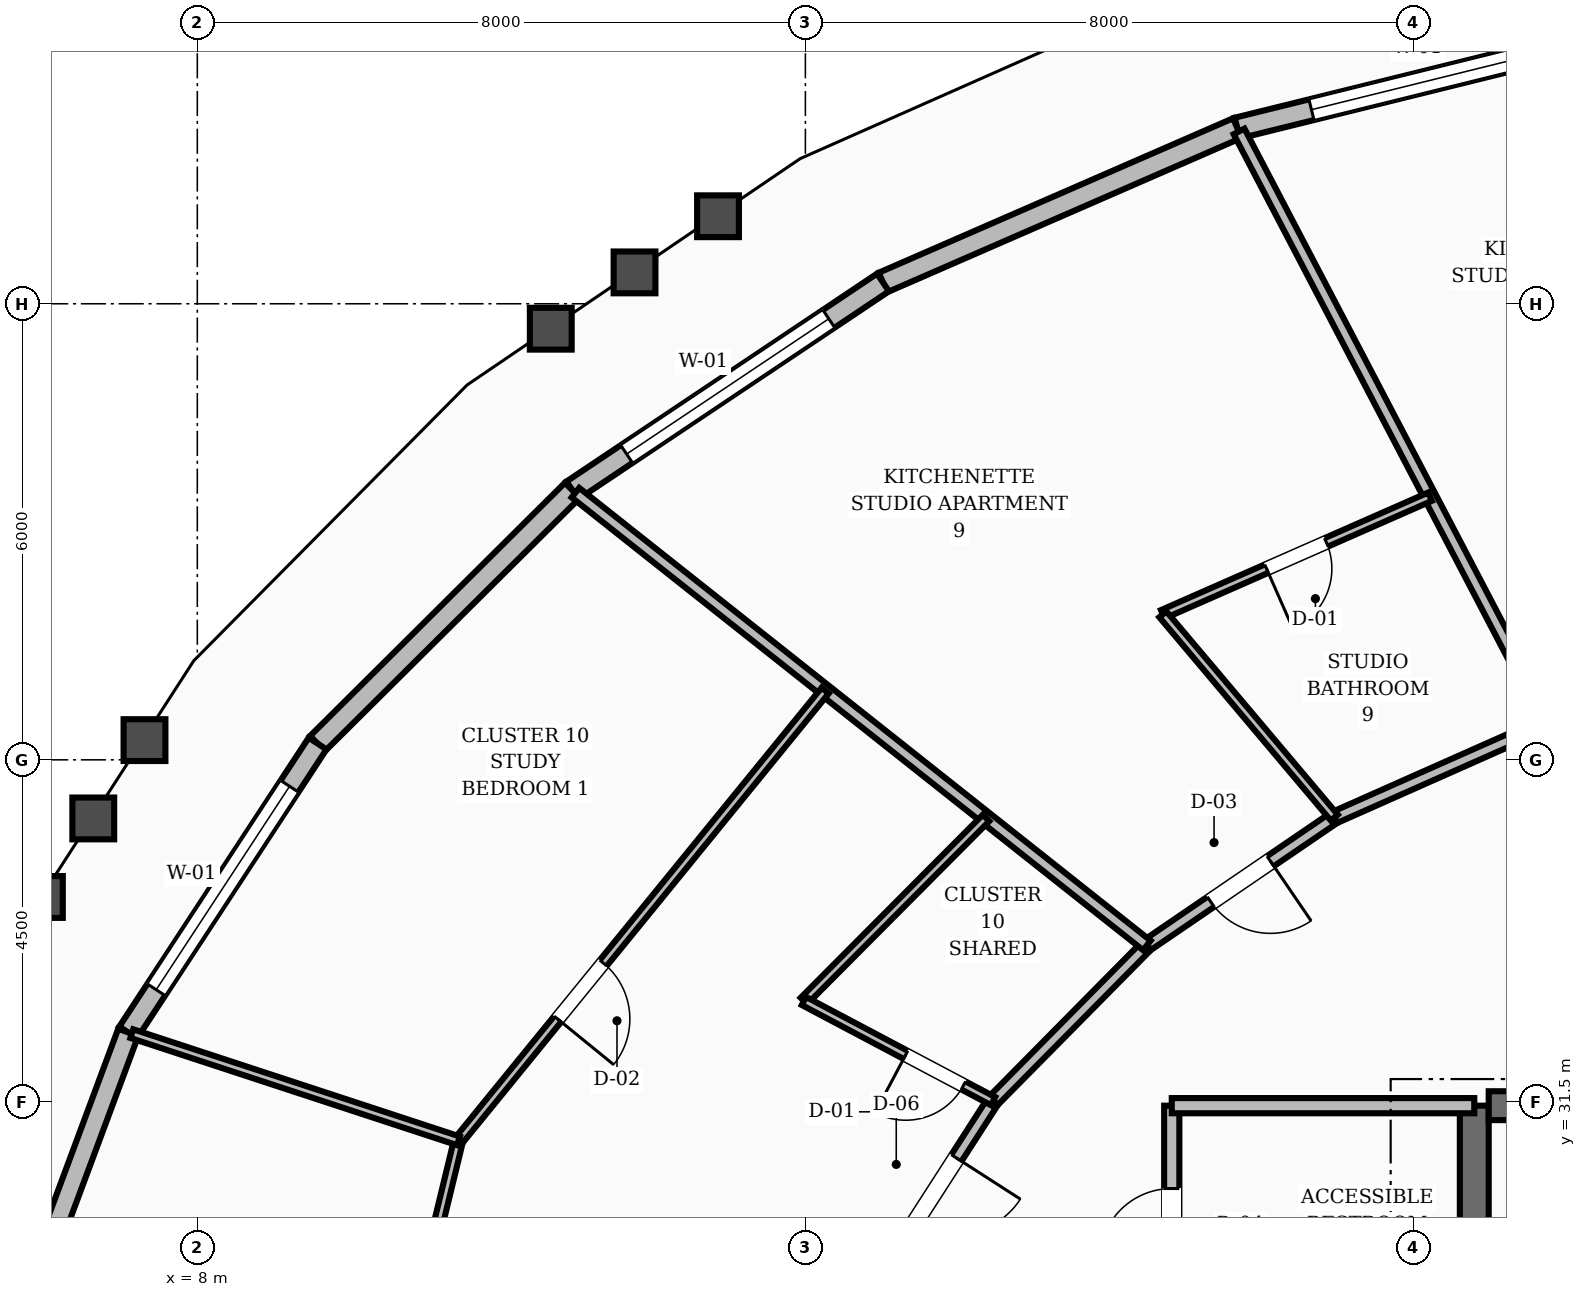
"""IFC4 building model, lengths in metres.
Left out: names, types, materials, properties, quantities, classifications, styles, units other than length and angle.
Written with IfcOpenShell. Run it as: python <this file> out.ifc"""

import sys

from ifc_helpers import new_model, si_unit, direction, frame, frame_2d, origin, place, context, subcontext, project, spatial, rectangle, extrude, element, fill, save


model = new_model("IFC4")
c1 = context("Model", 3, precision=1e-05, world=origin(), true_north=direction((0.0, 1.0)))
c2 = subcontext(c1, "Body", "Model", "MODEL_VIEW")
j1 = project(units=[si_unit("LENGTHUNIT", "METRE"), si_unit("PLANEANGLEUNIT", "RADIAN")], contexts=[c1])
p1 = place(None, origin())
s1 = spatial("IfcSite", under=j1, at=p1, CompositionType="ELEMENT")
p2 = place(p1, origin())
s2 = spatial("IfcBuilding", under=s1, at=p2, CompositionType="ELEMENT")
p3 = place(p2, frame((0.0, 0.0, 91.6)))
s3 = spatial("IfcBuildingStorey", under=s2, at=p3, CompositionType="ELEMENT", Elevation=91.6)
p4 = place(p3, frame((24.8, 25.15, 0.0), z_axis=(0.0, 0.0, 1.0), x_axis=(0.0, 1.0, 0.0)))
e1 = element("IfcWall", 1, at=p4, inside=s3, PredefinedType="SHEAR", context=c2, shape_type="SweptSolid", body=[
    extrude(rectangle(XDim=6.3, YDim=0.38, at=frame_2d((3.15, 0.0))), origin(), (0.0, 0.0, 1.0), 3.6),
])
p5 = place(p3, frame((24.99, 31.45, 0.0), z_axis=(0.0, 0.0, 1.0), x_axis=(1.0, 0.0, 0.0)))
e2 = element("IfcWall", 2, at=p5, inside=s3, PredefinedType="SHEAR", context=c2, shape_type="SweptSolid", body=[
    extrude(rectangle(XDim=3.21, YDim=0.38, at=frame_2d((1.605, 0.0))), origin(), (0.0, 0.0, 1.0), 3.6),
])
p6 = place(p3, frame((26.74, 45.562, 0.0), z_axis=(0.0, 0.0, 1.0), x_axis=(-0.970745887498, -0.240109187466, 0.0)))
e3 = element("IfcWall", 3, at=p6, inside=s3, PredefinedType="STANDARD", context=c2, shape_type="SweptSolid", body=[
    extrude(rectangle(XDim=5.21, YDim=0.28, at=frame_2d((2.605, 0.0))), origin(), (0.0, 0.0, 1.0), 2.71),
])
p7 = place(p6, frame((1.005, 0.0, 0.8)))
e4 = element("IfcOpeningElement", 4, at=p7, cuts=e3, PredefinedType="OPENING", context=c2, shape_type="SweptSolid", body=[
    extrude(rectangle(XDim=3.2, YDim=1.65, at=frame_2d((1.6, 0.825))), frame((0.0, 0.15, 0.0), z_axis=(0.0, -1.0, 0.0), x_axis=(1.0, 0.0, 0.0)), (0.0, 0.0, 1.0), 0.3),
])
p8 = place(p3, frame((21.682, 44.312, 0.0), z_axis=(0.0, 0.0, 1.0), x_axis=(-0.916706336202, -0.399561626244, 0.0)))
e5 = element("IfcWall", 5, at=p8, inside=s3, PredefinedType="STANDARD", context=c2, shape_type="SweptSolid", body=[
    extrude(rectangle(XDim=5.085, YDim=0.28, at=frame_2d((2.542, 0.0))), origin(), (0.0, 0.0, 1.0), 2.71),
])
p9 = place(p3, frame((17.021, 42.28, 0.0), z_axis=(0.0, 0.0, 1.0), x_axis=(-0.831078719633, -0.556154800189, 0.0)))
e6 = element("IfcWall", 6, at=p9, inside=s3, PredefinedType="STANDARD", context=c2, shape_type="SweptSolid", body=[
    extrude(rectangle(XDim=4.916, YDim=0.28, at=frame_2d((2.458, 0.0))), origin(), (0.0, 0.0, 1.0), 2.71),
])
p10 = place(p9, frame((0.858, 0.0, 0.8)))
e7 = element("IfcOpeningElement", 7, at=p10, cuts=e6, PredefinedType="OPENING", context=c2, shape_type="SweptSolid", body=[
    extrude(rectangle(XDim=3.2, YDim=1.65, at=frame_2d((1.6, 0.825))), frame((0.0, 0.15, 0.0), z_axis=(0.0, -1.0, 0.0), x_axis=(1.0, 0.0, 0.0)), (0.0, 0.0, 1.0), 0.3),
])
p11 = place(p3, frame((12.935, 39.546, 0.0), z_axis=(0.0, 0.0, 1.0), x_axis=(-0.709375776042, -0.704830482006, 0.0)))
e8 = element("IfcWall", 8, at=p11, inside=s3, PredefinedType="STANDARD", context=c2, shape_type="SweptSolid", body=[
    extrude(rectangle(XDim=4.727, YDim=0.28, at=frame_2d((2.363, 0.0))), origin(), (0.0, 0.0, 1.0), 2.71),
])
p12 = place(p3, frame((9.582, 36.214, 0.0), z_axis=(0.0, 0.0, 1.0), x_axis=(-0.548224545432, -0.836331183076, 0.0)))
e9 = element("IfcWall", 9, at=p12, inside=s3, PredefinedType="STANDARD", context=c2, shape_type="SweptSolid", body=[
    extrude(rectangle(XDim=4.545, YDim=0.28, at=frame_2d((2.272, 0.0))), origin(), (0.0, 0.0, 1.0), 2.71),
])
p13 = place(p12, frame((0.672, 0.0, 0.8)))
e10 = element("IfcOpeningElement", 10, at=p13, cuts=e9, PredefinedType="OPENING", context=c2, shape_type="SweptSolid", body=[
    extrude(rectangle(XDim=3.2, YDim=1.65, at=frame_2d((1.6, 0.825))), frame((0.0, 0.15, 0.0), z_axis=(0.0, -1.0, 0.0), x_axis=(1.0, 0.0, 0.0)), (0.0, 0.0, 1.0), 0.3),
])
p14 = place(p3, frame((7.091, 32.413, 0.0), z_axis=(0.0, 0.0, 1.0), x_axis=(-0.348647575397, -0.937253897388, 0.0)))
e11 = element("IfcWall", 11, at=p14, inside=s3, PredefinedType="STANDARD", context=c2, shape_type="SweptSolid", body=[
    extrude(rectangle(XDim=4.4, YDim=0.28, at=frame_2d((2.2, 0.0))), origin(), (0.0, 0.0, 1.0), 2.71),
])
p15 = place(p3, frame((20.82, 28.32, 0.0), z_axis=(0.0, 0.0, 1.0), x_axis=(0.0, 1.0, 0.0)))
e12 = element("IfcWall", 12, at=p15, inside=s3, PredefinedType="SOLIDWALL", context=c2, shape_type="SweptSolid", body=[
    extrude(rectangle(XDim=3.13, YDim=0.2, at=frame_2d((1.565, 0.0))), origin(), (0.0, 0.0, 1.0), 2.71),
])
p16 = place(p15, frame((1.09, 0.0, 0.0)))
e13 = element("IfcOpeningElement", 13, at=p16, cuts=e12, PredefinedType="OPENING", context=c2, shape_type="SweptSolid", body=[
    extrude(rectangle(XDim=0.95, YDim=2.1, at=frame_2d((0.475, 1.05))), frame((0.0, 0.11, 0.0), z_axis=(0.0, -1.0, 0.0), x_axis=(1.0, 0.0, 0.0)), (0.0, 0.0, 1.0), 0.22),
])
p17 = place(p3, frame((20.82, 31.45, 0.0), z_axis=(0.0, 0.0, 1.0), x_axis=(1.0, 0.0, 0.0)))
e14 = element("IfcWall", 14, at=p17, inside=s3, PredefinedType="SOLIDWALL", context=c2, shape_type="SweptSolid", body=[
    extrude(rectangle(XDim=3.98, YDim=0.2, at=frame_2d((1.99, 0.0))), origin(), (0.0, 0.0, 1.0), 2.71),
])
p18 = place(p3, frame((25.772, 36.489, 0.0), z_axis=(0.0, 0.0, 1.0), x_axis=(-0.913952123493, -0.405822024984, 0.0)))
e15 = element("IfcWall", 15, at=p18, inside=s3, PredefinedType="SOLIDWALL", context=c2, shape_type="SweptSolid", body=[
    extrude(rectangle(XDim=3.078, YDim=0.16, at=frame_2d((1.539, 0.0))), origin(), (0.0, 0.0, 1.0), 2.71),
])
p19 = place(p3, frame((22.959, 35.24, 0.0), z_axis=(0.0, 0.0, 1.0), x_axis=(-0.826293096206, -0.56324037423, 0.0)))
e16 = element("IfcWall", 16, at=p19, inside=s3, PredefinedType="SOLIDWALL", context=c2, shape_type="SweptSolid", body=[
    extrude(rectangle(XDim=2.985, YDim=0.16, at=frame_2d((1.492, 0.0))), origin(), (0.0, 0.0, 1.0), 2.71),
])
p20 = place(p19, frame((1.017, 0.0, 0.0)))
e17 = element("IfcOpeningElement", 17, at=p20, cuts=e16, PredefinedType="OPENING", context=c2, shape_type="SweptSolid", body=[
    extrude(rectangle(XDim=0.95, YDim=2.1, at=frame_2d((0.475, 1.05))), frame((0.0, 0.09, 0.0), z_axis=(0.0, -1.0, 0.0), x_axis=(1.0, 0.0, 0.0)), (0.0, 0.0, 1.0), 0.18),
])
p21 = place(p3, frame((20.492, 33.559, 0.0), z_axis=(0.0, 0.0, 1.0), x_axis=(-0.702811997, -0.711375636969, 0.0)))
e18 = element("IfcWall", 18, at=p21, inside=s3, PredefinedType="SOLIDWALL", context=c2, shape_type="SweptSolid", body=[
    extrude(rectangle(XDim=2.879, YDim=0.16, at=frame_2d((1.44, 0.0))), origin(), (0.0, 0.0, 1.0), 2.71),
])
p22 = place(p3, frame((18.469, 31.51, 0.0), z_axis=(0.0, 0.0, 1.0), x_axis=(-0.541126045017, -0.840941498206, 0.0)))
e19 = element("IfcWall", 19, at=p22, inside=s3, PredefinedType="SOLIDWALL", context=c2, shape_type="SweptSolid", body=[
    extrude(rectangle(XDim=2.779, YDim=0.16, at=frame_2d((1.39, 0.0))), origin(), (0.0, 0.0, 1.0), 2.71),
])
p23 = place(p22, frame((0.89, 0.0, 0.0)))
e20 = element("IfcOpeningElement", 20, at=p23, cuts=e19, PredefinedType="OPENING", context=c2, shape_type="SweptSolid", body=[
    extrude(rectangle(XDim=1.0, YDim=2.1, at=frame_2d((0.5, 1.05))), frame((0.0, 0.09, 0.0), z_axis=(0.0, -1.0, 0.0), x_axis=(1.0, 0.0, 0.0)), (0.0, 0.0, 1.0), 0.18),
])
p24 = place(p3, frame((25.772, 36.489, 0.0), z_axis=(0.0, 0.0, 1.0), x_axis=(-0.463329180803, 0.886186250297, 0.0)))
e21 = element("IfcWall", 21, at=p24, inside=s3, PredefinedType="SOLIDWALL", context=c2, shape_type="SweptSolid", body=[
    extrude(rectangle(XDim=8.777, YDim=0.16, at=frame_2d((4.389, 0.0))), origin(), (0.0, 0.0, 1.0), 2.71),
])
p25 = place(p3, frame((24.218, 39.462, 0.0), z_axis=(0.0, 0.0, 1.0), x_axis=(-0.915338463075, -0.402685358582, 0.0)))
e22 = element("IfcWall", 22, at=p25, inside=s3, PredefinedType="PARTITIONING", context=c2, shape_type="SweptSolid", body=[
    extrude(rectangle(XDim=3.841, YDim=0.12, at=frame_2d((1.92, 0.0))), origin(), (0.0, 0.0, 1.0), 2.71),
])
p26 = place(p25, frame((1.49, 0.0, 0.0)))
e23 = element("IfcOpeningElement", 23, at=p26, cuts=e22, PredefinedType="OPENING", context=c2, shape_type="SweptSolid", body=[
    extrude(rectangle(XDim=0.86, YDim=2.1, at=frame_2d((0.43, 1.05))), frame((0.0, 0.07, 0.0), z_axis=(0.0, -1.0, 0.0), x_axis=(1.0, 0.0, 0.0)), (0.0, 0.0, 1.0), 0.14),
])
p27 = place(p3, frame((22.959, 35.24, 0.0), z_axis=(0.0, 0.0, 1.0), x_axis=(-0.644715569152, 0.764422549964, 0.0)))
e24 = element("IfcWall", 24, at=p27, inside=s3, PredefinedType="PARTITIONING", context=c2, shape_type="SweptSolid", body=[
    extrude(rectangle(XDim=3.5, YDim=0.12, at=frame_2d((1.75, 0.0))), origin(), (0.0, 0.0, 1.0), 2.71),
])
p28 = place(p3, frame((20.492, 33.559, 0.0), z_axis=(0.0, 0.0, 1.0), x_axis=(-0.783820213827, 0.620987819846, 0.0)))
e25 = element("IfcWall", 25, at=p28, inside=s3, PredefinedType="SOLIDWALL", context=c2, shape_type="SweptSolid", body=[
    extrude(rectangle(XDim=9.591, YDim=0.16, at=frame_2d((4.796, 0.0))), origin(), (0.0, 0.0, 1.0), 2.71),
])
p29 = place(p3, frame((18.376, 35.235, 0.0), z_axis=(0.0, 0.0, 1.0), x_axis=(-0.705379680945, -0.708829673271, 0.0)))
e26 = element("IfcWall", 26, at=p29, inside=s3, PredefinedType="PARTITIONING", context=c2, shape_type="SweptSolid", body=[
    extrude(rectangle(XDim=3.397, YDim=0.12, at=frame_2d((1.698, 0.0))), origin(), (0.0, 0.0, 1.0), 2.71),
])
p30 = place(p3, frame((18.469, 31.51, 0.0), z_axis=(0.0, 0.0, 1.0), x_axis=(-0.883815336017, 0.467835924039, 0.0)))
e27 = element("IfcWall", 27, at=p30, inside=s3, PredefinedType="PARTITIONING", context=c2, shape_type="SweptSolid", body=[
    extrude(rectangle(XDim=2.815, YDim=0.12, at=frame_2d((1.408, 0.0))), origin(), (0.0, 0.0, 1.0), 2.71),
])
p31 = place(p30, frame((0.44, 0.0, 0.0)))
e28 = element("IfcOpeningElement", 28, at=p31, cuts=e27, PredefinedType="OPENING", context=c2, shape_type="SweptSolid", body=[
    extrude(rectangle(XDim=0.86, YDim=2.1, at=frame_2d((0.43, 1.05))), frame((0.0, 0.07, 0.0), z_axis=(0.0, -1.0, 0.0), x_axis=(1.0, 0.0, 0.0)), (0.0, 0.0, 1.0), 0.14),
])
p32 = place(p3, frame((16.26, 36.911, 0.0), z_axis=(0.0, 0.0, 1.0), x_axis=(-0.631544914576, -0.775339294034, 0.0)))
e29 = element("IfcWall", 29, at=p32, inside=s3, PredefinedType="PARTITIONING", context=c2, shape_type="SweptSolid", body=[
    extrude(rectangle(XDim=7.64, YDim=0.12, at=frame_2d((3.82, 0.0))), origin(), (0.0, 0.0, 1.0), 2.71),
])
p33 = place(p32, frame((4.623, 0.0, 0.0)))
e30 = element("IfcOpeningElement", 30, at=p33, cuts=e29, PredefinedType="OPENING", context=c2, shape_type="SweptSolid", body=[
    extrude(rectangle(XDim=0.95, YDim=2.1, at=frame_2d((0.475, 1.05))), frame((0.0, 0.07, 0.0), z_axis=(0.0, -1.0, 0.0), x_axis=(1.0, 0.0, 0.0)), (0.0, 0.0, 1.0), 0.14),
])
p34 = place(p3, frame((11.435, 30.988, 0.0), z_axis=(0.0, 0.0, 1.0), x_axis=(-0.235650560851, -0.971837853333, 0.0)))
e31 = element("IfcWall", 31, at=p34, inside=s3, PredefinedType="PARTITIONING", context=c2, shape_type="SweptSolid", body=[
    extrude(rectangle(XDim=7.19, YDim=0.12, at=frame_2d((3.595, 0.0))), origin(), (0.0, 0.0, 1.0), 2.71),
])
p35 = place(p34, frame((3.12, 0.0, 0.0)))
e32 = element("IfcOpeningElement", 32, at=p35, cuts=e31, PredefinedType="OPENING", context=c2, shape_type="SweptSolid", body=[
    extrude(rectangle(XDim=0.95, YDim=2.1, at=frame_2d((0.475, 1.05))), frame((0.0, 0.07, 0.0), z_axis=(0.0, -1.0, 0.0), x_axis=(1.0, 0.0, 0.0)), (0.0, 0.0, 1.0), 0.14),
])
p36 = place(p3, frame((11.435, 30.988, 0.0), z_axis=(0.0, 0.0, 1.0), x_axis=(-0.950146719348, 0.311803161806, 0.0)))
e33 = element("IfcWall", 33, at=p36, inside=s3, PredefinedType="PARTITIONING", context=c2, shape_type="SweptSolid", body=[
    extrude(rectangle(XDim=4.523, YDim=0.12, at=frame_2d((2.261, 0.0))), origin(), (0.0, 0.0, 1.0), 2.71),
])
p37 = place(p7, origin())
e34 = element("IfcWindow", 34, at=p37, inside=s3, PartitioningType="SINGLE_PANEL", PredefinedType="WINDOW", context=c2, shape_type="SweptSolid", body=[
    extrude(rectangle(XDim=3.2, YDim=1.65, at=frame_2d((1.6, 0.825))), frame((0.0, 0.03, 0.0), z_axis=(0.0, -1.0, 0.0), x_axis=(1.0, 0.0, 0.0)), (0.0, 0.0, 1.0), 0.06),
])
fill(e4, e34)
p38 = place(p10, origin())
e35 = element("IfcWindow", 35, at=p38, inside=s3, PartitioningType="SINGLE_PANEL", PredefinedType="WINDOW", context=c2, shape_type="SweptSolid", body=[
    extrude(rectangle(XDim=3.2, YDim=1.65, at=frame_2d((1.6, 0.825))), frame((0.0, 0.03, 0.0), z_axis=(0.0, -1.0, 0.0), x_axis=(1.0, 0.0, 0.0)), (0.0, 0.0, 1.0), 0.06),
])
fill(e7, e35)
p39 = place(p13, origin())
e36 = element("IfcWindow", 36, at=p39, inside=s3, PartitioningType="SINGLE_PANEL", PredefinedType="WINDOW", context=c2, shape_type="SweptSolid", body=[
    extrude(rectangle(XDim=3.2, YDim=1.65, at=frame_2d((1.6, 0.825))), frame((0.0, 0.03, 0.0), z_axis=(0.0, -1.0, 0.0), x_axis=(1.0, 0.0, 0.0)), (0.0, 0.0, 1.0), 0.06),
])
fill(e10, e36)
p40 = place(p16, origin())
e37 = element("IfcDoor", 37, at=p40, inside=s3, OperationType="SINGLE_SWING_LEFT", PredefinedType="DOOR", context=c2, shape_type="SweptSolid", body=[
    extrude(rectangle(XDim=0.95, YDim=2.1, at=frame_2d((0.475, 1.05))), frame((0.0, 0.025, 0.0), z_axis=(0.0, -1.0, 0.0), x_axis=(1.0, 0.0, 0.0)), (0.0, 0.0, 1.0), 0.05),
])
fill(e13, e37)
p41 = place(p26, origin())
e38 = element("IfcDoor", 38, at=p41, inside=s3, OperationType="SINGLE_SWING_RIGHT", PredefinedType="DOOR", context=c2, shape_type="SweptSolid", body=[
    extrude(rectangle(XDim=0.86, YDim=2.1, at=frame_2d((0.43, 1.05))), frame((0.0, 0.025, 0.0), z_axis=(0.0, -1.0, 0.0), x_axis=(1.0, 0.0, 0.0)), (0.0, 0.0, 1.0), 0.05),
])
fill(e23, e38)
p42 = place(p20, origin())
e39 = element("IfcDoor", 39, at=p42, inside=s3, OperationType="SINGLE_SWING_LEFT", PredefinedType="DOOR", context=c2, shape_type="SweptSolid", body=[
    extrude(rectangle(XDim=0.95, YDim=2.1, at=frame_2d((0.475, 1.05))), frame((0.0, 0.025, 0.0), z_axis=(0.0, -1.0, 0.0), x_axis=(1.0, 0.0, 0.0)), (0.0, 0.0, 1.0), 0.05),
])
fill(e17, e39)
p43 = place(p31, origin())
e40 = element("IfcDoor", 40, at=p43, inside=s3, OperationType="SINGLE_SWING_RIGHT", PredefinedType="DOOR", context=c2, shape_type="SweptSolid", body=[
    extrude(rectangle(XDim=0.86, YDim=2.1, at=frame_2d((0.43, 1.05))), frame((0.0, 0.025, 0.0), z_axis=(0.0, -1.0, 0.0), x_axis=(1.0, 0.0, 0.0)), (0.0, 0.0, 1.0), 0.05),
])
fill(e28, e40)
p44 = place(p23, origin())
e41 = element("IfcDoor", 41, at=p44, inside=s3, OperationType="SINGLE_SWING_LEFT", PredefinedType="DOOR", context=c2, shape_type="SweptSolid", body=[
    extrude(rectangle(XDim=1.0, YDim=2.1, at=frame_2d((0.5, 1.05))), frame((0.0, 0.025, 0.0), z_axis=(0.0, -1.0, 0.0), x_axis=(1.0, 0.0, 0.0)), (0.0, 0.0, 1.0), 0.05),
])
fill(e20, e41)
p45 = place(p33, origin())
e42 = element("IfcDoor", 42, at=p45, inside=s3, OperationType="SINGLE_SWING_RIGHT", PredefinedType="DOOR", context=c2, shape_type="SweptSolid", body=[
    extrude(rectangle(XDim=0.95, YDim=2.1, at=frame_2d((0.475, 1.05))), frame((0.0, 0.025, 0.0), z_axis=(0.0, -1.0, 0.0), x_axis=(1.0, 0.0, 0.0)), (0.0, 0.0, 1.0), 0.05),
])
fill(e30, e42)
save(model, sys.argv[1])
